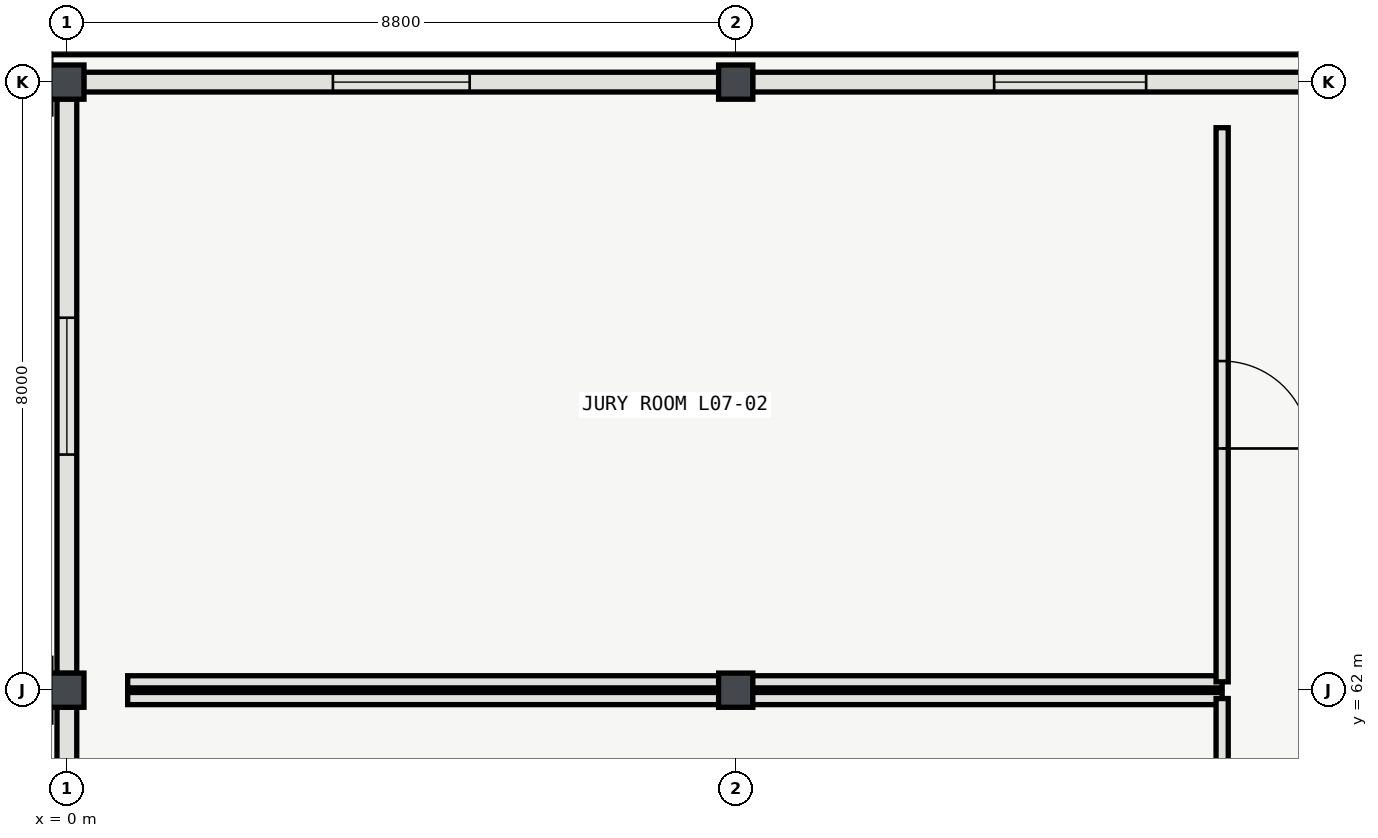
"""IFC4 building model, lengths in metres.
Left out: names, types, materials, properties, quantities, classifications, styles, units other than length and angle.
Written with IfcOpenShell. Run it as: python <this file> out.ifc"""

import sys

from ifc_helpers import new_model, si_unit, direction, frame, frame_2d, origin, origin_2d, place, context, subcontext, project, spatial, rectangle, hollow_rectangle, extrude, element, fill, save


model = new_model("IFC4")
c1 = context("Model", 3, precision=1e-05, world=origin(), true_north=direction((0.0, 1.0)))
c2 = subcontext(c1, "Body", "Model", "MODEL_VIEW")
j1 = project(units=[si_unit("LENGTHUNIT", "METRE"), si_unit("PLANEANGLEUNIT", "RADIAN")], contexts=[c1])
p1 = place(None, origin())
s1 = spatial("IfcSite", under=j1, at=p1, CompositionType="ELEMENT")
p2 = place(p1, origin())
s2 = spatial("IfcBuilding", under=s1, at=p2, CompositionType="ELEMENT")
p3 = place(p2, frame((0.0, 0.0, 33.0)))
s3 = spatial("IfcBuildingStorey", under=s2, at=p3, CompositionType="ELEMENT", Elevation=33.0)
for number, where, z_axis, x_axis in (
    (1, (0.0, 62.0, 0.0), (0.0, 0.0, 1.0), (1.0, 0.0, 0.0)),
    (2, (0.0, 70.0, 0.0), (0.0, 0.0, 1.0), (1.0, 0.0, 0.0)),
    (3, (8.8, 62.0, 0.0), (0.0, 0.0, 1.0), (1.0, 0.0, 0.0)),
    (4, (8.8, 70.0, 0.0), (0.0, 0.0, 1.0), (1.0, 0.0, 0.0)),
):
    element("IfcColumn", number, at=place(p3, frame(where, z_axis=z_axis, x_axis=x_axis)), inside=s3, PredefinedType="COLUMN", context=c2, shape_type="SweptSolid", body=[
        extrude(hollow_rectangle(XDim=0.45, YDim=0.45, WallThickness=0.018, InnerFilletRadius=0.018, OuterFilletRadius=0.036, at=origin_2d()), origin(), (0.0, 0.0, 1.0), 4.2),
    ])
p4 = place(p3, frame((8.579, 70.0, 0.0), z_axis=(0.0, 0.0, 1.0), x_axis=(-1.0, 0.0, 0.0)))
e5 = element("IfcWall", 5, at=p4, inside=s3, PredefinedType="SOLIDWALL", context=c2, shape_type="SweptSolid", body=[
    extrude(rectangle(XDim=8.358, YDim=0.26, at=frame_2d((4.179, 0.0))), origin(), (0.0, 0.0, 1.0), 3.483),
])
p5 = place(p4, frame((3.279, 0.0, 0.95)))
e6 = element("IfcOpeningElement", 6, at=p5, cuts=e5, PredefinedType="OPENING", context=c2, shape_type="SweptSolid", body=[
    extrude(rectangle(XDim=1.8, YDim=1.8, at=frame_2d((0.9, 0.9))), frame((0.0, 0.14, 0.0), z_axis=(0.0, -1.0, 0.0), x_axis=(1.0, 0.0, 0.0)), (0.0, 0.0, 1.0), 0.28),
])
p6 = place(p3, frame((17.304, 70.0, 0.0), z_axis=(0.0, 0.0, 1.0), x_axis=(-1.0, 0.0, 0.0)))
e7 = element("IfcWall", 7, at=p6, inside=s3, PredefinedType="SOLIDWALL", context=c2, shape_type="SweptSolid", body=[
    extrude(rectangle(XDim=8.283, YDim=0.26, at=frame_2d((4.142, 0.0))), origin(), (0.0, 0.0, 1.0), 3.483),
])
p7 = place(p6, frame((3.104, 0.0, 0.95)))
e8 = element("IfcOpeningElement", 8, at=p7, cuts=e7, PredefinedType="OPENING", context=c2, shape_type="SweptSolid", body=[
    extrude(rectangle(XDim=2.0, YDim=1.8, at=frame_2d((1.0, 0.9))), frame((0.0, 0.14, 0.0), z_axis=(0.0, -1.0, 0.0), x_axis=(1.0, 0.0, 0.0)), (0.0, 0.0, 1.0), 0.28),
])
p8 = place(p3, frame((0.0, 61.779, 0.0), z_axis=(0.0, 0.0, 1.0), x_axis=(0.0, -1.0, 0.0)))
e9 = element("IfcWall", 9, at=p8, inside=s3, PredefinedType="SOLIDWALL", context=c2, shape_type="SweptSolid", body=[
    extrude(rectangle(XDim=7.558, YDim=0.26, at=frame_2d((3.779, 0.0))), origin(), (0.0, 0.0, 1.0), 3.483),
])
p9 = place(p8, frame((2.954, 0.0, 0.95)))
e10 = element("IfcOpeningElement", 10, at=p9, cuts=e9, PredefinedType="OPENING", context=c2, shape_type="SweptSolid", body=[
    extrude(rectangle(XDim=1.65, YDim=2.1, at=frame_2d((0.825, 1.05))), frame((0.0, 0.14, 0.0), z_axis=(0.0, -1.0, 0.0), x_axis=(1.0, 0.0, 0.0)), (0.0, 0.0, 1.0), 0.28),
])
p10 = place(p3, frame((0.0, 69.779, 0.0), z_axis=(0.0, 0.0, 1.0), x_axis=(0.0, -1.0, 0.0)))
e11 = element("IfcWall", 11, at=p10, inside=s3, PredefinedType="SOLIDWALL", context=c2, shape_type="SweptSolid", body=[
    extrude(rectangle(XDim=7.558, YDim=0.26, at=frame_2d((3.779, 0.0))), origin(), (0.0, 0.0, 1.0), 3.483),
])
p11 = place(p10, frame((2.879, 0.0, 0.95)))
e12 = element("IfcOpeningElement", 12, at=p11, cuts=e11, PredefinedType="OPENING", context=c2, shape_type="SweptSolid", body=[
    extrude(rectangle(XDim=1.8, YDim=2.1, at=frame_2d((0.9, 1.05))), frame((0.0, 0.14, 0.0), z_axis=(0.0, -1.0, 0.0), x_axis=(1.0, 0.0, 0.0)), (0.0, 0.0, 1.0), 0.28),
])
p12 = place(p3, frame((44.34, 70.44, 0.0), z_axis=(0.0, 0.0, 1.0), x_axis=(-1.0, 0.0, 0.0)))
e13 = element("IfcWall", 13, at=p12, inside=s3, PredefinedType="SOLIDWALL", context=c2, shape_type="SweptSolid", body=[
    extrude(rectangle(XDim=44.68, YDim=0.16, at=frame_2d((22.34, 0.0))), origin(), (0.0, 0.0, 1.0), 0.58),
])
p13 = place(p3, frame((15.2, 61.89, 0.0), z_axis=(0.0, 0.0, 1.0), x_axis=(-1.0, 0.0, 0.0)))
e14 = element("IfcWall", 14, at=p13, inside=s3, PredefinedType="PARTITIONING", context=c2, shape_type="SweptSolid", body=[
    extrude(rectangle(XDim=14.4, YDim=0.16, at=frame_2d((7.2, 0.0))), origin(), (0.0, 0.0, 1.0), 3.636),
])
p14 = place(p3, frame((15.2, 54.6, 0.0), z_axis=(0.0, 0.0, 1.0), x_axis=(0.0, 1.0, 0.0)))
e15 = element("IfcWall", 15, at=p14, inside=s3, PredefinedType="PARTITIONING", context=c2, shape_type="SweptSolid", body=[
    extrude(rectangle(XDim=7.29, YDim=0.16, at=frame_2d((3.645, 0.0))), origin(), (0.0, 0.0, 1.0), 3.92),
])
p15 = place(p14, frame((3.085, 0.0, 0.0)))
e16 = element("IfcOpeningElement", 16, at=p15, cuts=e15, PredefinedType="OPENING", context=c2, shape_type="SweptSolid", body=[
    extrude(rectangle(XDim=1.12, YDim=2.2, at=frame_2d((0.56, 1.1))), frame((0.0, 0.09, 0.0), z_axis=(0.0, -1.0, 0.0), x_axis=(1.0, 0.0, 0.0)), (0.0, 0.0, 1.0), 0.18),
])
p16 = place(p3, frame((0.8, 62.11, 0.0), z_axis=(0.0, 0.0, 1.0), x_axis=(1.0, 0.0, 0.0)))
e17 = element("IfcWall", 17, at=p16, inside=s3, PredefinedType="PARTITIONING", context=c2, shape_type="SweptSolid", body=[
    extrude(rectangle(XDim=14.4, YDim=0.16, at=frame_2d((7.2, 0.0))), origin(), (0.0, 0.0, 1.0), 3.636),
])
p17 = place(p3, frame((15.2, 62.11, 0.0), z_axis=(0.0, 0.0, 1.0), x_axis=(0.0, 1.0, 0.0)))
e18 = element("IfcWall", 18, at=p17, inside=s3, PredefinedType="PARTITIONING", context=c2, shape_type="SweptSolid", body=[
    extrude(rectangle(XDim=7.29, YDim=0.16, at=frame_2d((3.645, 0.0))), origin(), (0.0, 0.0, 1.0), 3.92),
])
p18 = place(p17, frame((3.07, 0.0, 0.0)))
e19 = element("IfcOpeningElement", 19, at=p18, cuts=e18, PredefinedType="OPENING", context=c2, shape_type="SweptSolid", body=[
    extrude(rectangle(XDim=1.15, YDim=2.2, at=frame_2d((0.575, 1.1))), frame((0.0, 0.09, 0.0), z_axis=(0.0, -1.0, 0.0), x_axis=(1.0, 0.0, 0.0)), (0.0, 0.0, 1.0), 0.18),
])
p19 = place(p5, origin())
e20 = element("IfcWindow", 20, at=p19, inside=s3, PartitioningType="SINGLE_PANEL", PredefinedType="WINDOW", context=c2, shape_type="SweptSolid", body=[
    extrude(rectangle(XDim=1.8, YDim=1.8, at=frame_2d((0.9, 0.9))), frame((0.0, 0.03, 0.0), z_axis=(0.0, -1.0, 0.0), x_axis=(1.0, 0.0, 0.0)), (0.0, 0.0, 1.0), 0.06),
])
fill(e6, e20)
p20 = place(p7, origin())
e21 = element("IfcWindow", 21, at=p20, inside=s3, PartitioningType="SINGLE_PANEL", PredefinedType="WINDOW", context=c2, shape_type="SweptSolid", body=[
    extrude(rectangle(XDim=2.0, YDim=1.8, at=frame_2d((1.0, 0.9))), frame((0.0, 0.03, 0.0), z_axis=(0.0, -1.0, 0.0), x_axis=(1.0, 0.0, 0.0)), (0.0, 0.0, 1.0), 0.06),
])
fill(e8, e21)
p21 = place(p11, origin())
e22 = element("IfcWindow", 22, at=p21, inside=s3, PartitioningType="SINGLE_PANEL", PredefinedType="WINDOW", context=c2, shape_type="SweptSolid", body=[
    extrude(rectangle(XDim=1.8, YDim=2.1, at=frame_2d((0.9, 1.05))), frame((0.0, 0.03, 0.0), z_axis=(0.0, -1.0, 0.0), x_axis=(1.0, 0.0, 0.0)), (0.0, 0.0, 1.0), 0.06),
])
fill(e12, e22)
p22 = place(p18, origin())
e23 = element("IfcDoor", 23, at=p22, inside=s3, OperationType="SINGLE_SWING_LEFT", PredefinedType="DOOR", context=c2, shape_type="SweptSolid", body=[
    extrude(rectangle(XDim=1.15, YDim=2.2, at=frame_2d((0.575, 1.1))), frame((0.0, 0.025, 0.0), z_axis=(0.0, -1.0, 0.0), x_axis=(1.0, 0.0, 0.0)), (0.0, 0.0, 1.0), 0.05),
])
fill(e19, e23)
save(model, sys.argv[1])
